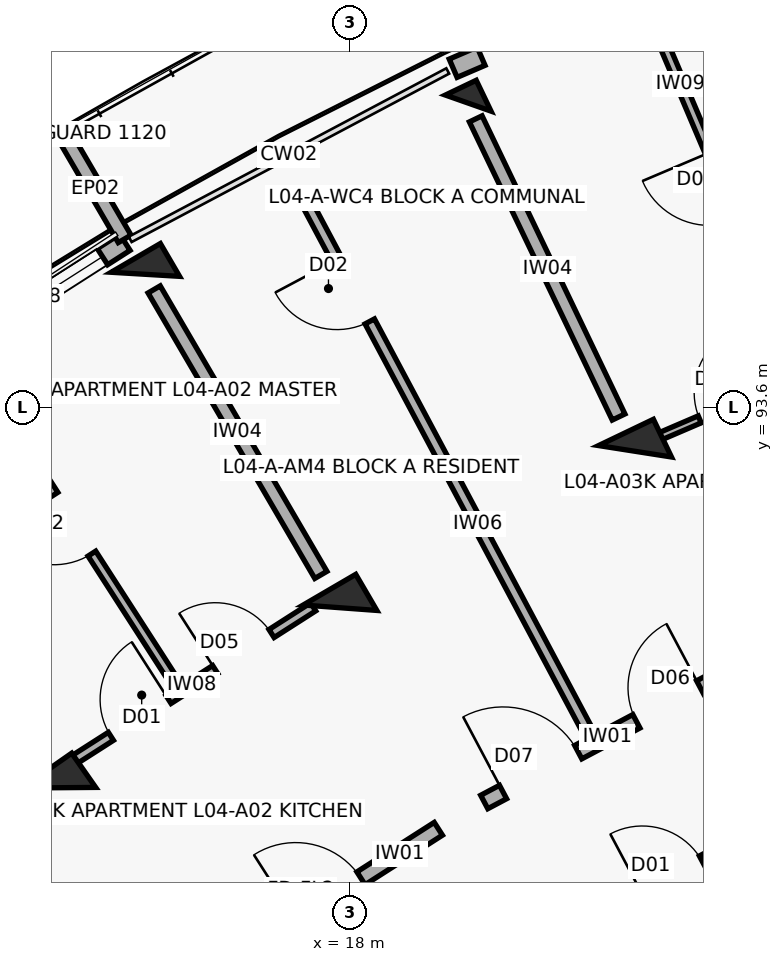
"""IFC4 building model, lengths in metres.
Left out: names, types, materials, properties, quantities, classifications, styles, units other than length and angle.
Written with IfcOpenShell. Run it as: python <this file> out.ifc"""

import sys

from ifc_helpers import new_model, si_unit, direction, frame, frame_2d, origin, origin_2d, place, context, subcontext, project, spatial, rectangle, extrude, element, fill, save


model = new_model("IFC4")
c1 = context("Model", 3, precision=1e-05, world=origin(), true_north=direction((0.0, 1.0)))
c2 = subcontext(c1, "Body", "Model", "MODEL_VIEW")
j1 = project(units=[si_unit("LENGTHUNIT", "METRE"), si_unit("PLANEANGLEUNIT", "RADIAN")], contexts=[c1])
p1 = place(None, origin())
s1 = spatial("IfcSite", under=j1, at=p1, CompositionType="ELEMENT")
p2 = place(p1, origin())
s2 = spatial("IfcBuilding", under=s1, at=p2, CompositionType="ELEMENT")
p3 = place(p2, frame((0.0, 0.0, 14.3)))
s3 = spatial("IfcBuildingStorey", under=s2, at=p3, CompositionType="ELEMENT", Elevation=14.3)
for number, where, z_axis, x_axis in (
    (1, (14.172, 88.592, 0.0), (0.0, 0.0, 1.0), (-0.573, 0.82, 0.0)),
    (2, (17.873, 90.96, 0.0), (0.0, 0.0, 1.0), (-0.504, 0.864, 0.0)),
):
    element("IfcColumn", number, at=place(p3, frame(where, z_axis=z_axis, x_axis=x_axis)), inside=s3, PredefinedType="COLUMN", context=c2, shape_type="SweptSolid", body=[
        extrude(rectangle(XDim=0.55, YDim=0.8, at=origin_2d()), origin(), (0.0, 0.0, 1.0), 3.1),
    ])
p4 = place(p3, frame((15.311, 95.347, 0.0), z_axis=(0.0, 0.0, 1.0), x_axis=(-0.504226211181, 0.863571611366, 0.0)))
e3 = element("IfcColumn", 3, at=p4, inside=s3, PredefinedType="COLUMN", context=c2, shape_type="SweptSolid", body=[
    extrude(rectangle(XDim=0.5, YDim=0.75, at=origin_2d()), origin(), (0.0, 0.0, 1.0), 3.1),
])
p5 = place(p3, frame((21.754, 93.019, 0.0), z_axis=(0.0, 0.0, 1.0), x_axis=(-0.432085748802, 0.901832526405, 0.0)))
e4 = element("IfcColumn", 4, at=p5, inside=s3, PredefinedType="COLUMN", context=c2, shape_type="SweptSolid", body=[
    extrude(rectangle(XDim=0.55, YDim=0.8, at=origin_2d()), origin(), (0.0, 0.0, 1.0), 3.1),
])
p6 = place(p3, frame((19.559, 97.6, 0.0), z_axis=(0.0, 0.0, 1.0), x_axis=(-0.432085748802, 0.901832526405, 0.0)))
e5 = element("IfcColumn", 5, at=p6, inside=s3, PredefinedType="COLUMN", context=c2, shape_type="SweptSolid", body=[
    extrude(rectangle(XDim=0.45, YDim=0.45, at=origin_2d()), origin(), (0.0, 0.0, 1.0), 3.1),
])
p7 = place(p3, frame((10.992, 93.176, 0.0), z_axis=(0.0, 0.0, 1.0), x_axis=(0.84226218024, 0.539068103061, 0.0)))
e6 = element("IfcWall", 6, at=p7, inside=s3, PredefinedType="SOLIDWALL", context=c2, shape_type="SweptSolid", body=[
    extrude(rectangle(XDim=4.809, YDim=0.252, at=frame_2d((2.404, 0.0))), origin(), (0.0, 0.0, 1.0), 2.25),
])
p8 = place(p7, frame((0.4, 0.0, 0.0)))
e7 = element("IfcOpeningElement", 7, at=p8, cuts=e6, PredefinedType="OPENING", context=c2, shape_type="SweptSolid", body=[
    extrude(rectangle(XDim=1.1, YDim=2.15, at=frame_2d((0.55, 1.075))), frame((0.0, 0.136, 0.0), z_axis=(0.0, -1.0, 0.0), x_axis=(1.0, 0.0, 0.0)), (0.0, 0.0, 1.0), 0.272),
])
p9 = place(p7, frame((2.659, 0.0, 0.35)))
e8 = element("IfcOpeningElement", 8, at=p9, cuts=e6, PredefinedType="OPENING", context=c2, shape_type="SweptSolid", body=[
    extrude(rectangle(XDim=1.8, YDim=1.65, at=frame_2d((0.9, 0.825))), frame((0.0, 0.136, 0.0), z_axis=(0.0, -1.0, 0.0), x_axis=(1.0, 0.0, 0.0)), (0.0, 0.0, 1.0), 0.272),
])
p10 = place(p3, frame((15.039, 95.813, 0.0), z_axis=(0.0, 0.0, 1.0), x_axis=(-0.504228145431, 0.863570481985, 0.0)))
e9 = element("IfcWall", 9, at=p10, inside=s3, PredefinedType="PARAPET", context=c2, shape_type="SweptSolid", body=[
    extrude(rectangle(XDim=1.53, YDim=0.195, at=frame_2d((0.765, 0.0))), origin(), (0.0, 0.0, 1.0), 2.25),
])
p11 = place(p3, frame((19.361, 98.059, 0.0), z_axis=(0.0, 0.0, 1.0), x_axis=(0.918711189033, 0.394930058548, 0.0)))
e10 = element("IfcWall", 10, at=p11, inside=s3, PredefinedType="SOLIDWALL", context=c2, shape_type="SweptSolid", body=[
    extrude(rectangle(XDim=4.809, YDim=0.262, at=frame_2d((2.404, 0.0))), origin(), (0.0, 0.0, 1.0), 2.25),
])
p12 = place(p11, frame((0.4, 0.0, 0.0)))
e11 = element("IfcOpeningElement", 11, at=p12, cuts=e10, PredefinedType="OPENING", context=c2, shape_type="SweptSolid", body=[
    extrude(rectangle(XDim=1.1, YDim=2.15, at=frame_2d((0.55, 1.075))), frame((0.0, 0.141, 0.0), z_axis=(0.0, -1.0, 0.0), x_axis=(1.0, 0.0, 0.0)), (0.0, 0.0, 1.0), 0.282),
])
p13 = place(p11, frame((2.659, 0.0, 0.35)))
e12 = element("IfcOpeningElement", 12, at=p13, cuts=e10, PredefinedType="OPENING", context=c2, shape_type="SweptSolid", body=[
    extrude(rectangle(XDim=1.8, YDim=1.65, at=frame_2d((0.9, 0.825))), frame((0.0, 0.141, 0.0), z_axis=(0.0, -1.0, 0.0), x_axis=(1.0, 0.0, 0.0)), (0.0, 0.0, 1.0), 0.282),
])
p14 = place(p3, frame((16.272, 86.199, 0.0), z_axis=(0.0, 0.0, 1.0), x_axis=(0.842257205985, 0.539075874963, 0.0)))
e13 = element("IfcWall", 13, at=p14, inside=s3, PredefinedType="SOLIDWALL", context=c2, shape_type="SweptSolid", body=[
    extrude(rectangle(XDim=3.436, YDim=0.2, at=frame_2d((1.718, 0.0))), origin(), (0.0, 0.0, 1.0), 2.08),
])
p15 = place(p14, frame((1.208, 0.0, 0.0)))
e14 = element("IfcOpeningElement", 14, at=p15, cuts=e13, PredefinedType="OPENING", context=c2, shape_type="SweptSolid", body=[
    extrude(rectangle(XDim=1.02, YDim=2.15, at=frame_2d((0.51, 1.075))), frame((0.0, 0.11, 0.0), z_axis=(0.0, -1.0, 0.0), x_axis=(1.0, 0.0, 0.0)), (0.0, 0.0, 1.0), 0.22),
])
p16 = place(p3, frame((14.311, 88.917, 0.0), z_axis=(0.0, 0.0, 1.0), x_axis=(0.842238809758, 0.53910461632, 0.0)))
e15 = element("IfcWall", 15, at=p16, inside=s3, PredefinedType="PARTITIONING", context=c2, shape_type="SweptSolid", body=[
    extrude(rectangle(XDim=3.81, YDim=0.125, at=frame_2d((1.905, 0.0))), origin(), (0.0, 0.0, 1.0), 2.08),
])
p17 = place(p16, frame((0.65, 0.0, 0.0)))
e16 = element("IfcOpeningElement", 16, at=p17, cuts=e15, PredefinedType="OPENING", context=c2, shape_type="SweptSolid", body=[
    extrude(rectangle(XDim=0.9, YDim=2.1, at=frame_2d((0.45, 1.05))), frame((0.0, 0.073, 0.0), z_axis=(0.0, -1.0, 0.0), x_axis=(1.0, 0.0, 0.0)), (0.0, 0.0, 1.0), 0.145),
])
p18 = place(p16, frame((2.28, 0.0, 0.0)))
e17 = element("IfcOpeningElement", 17, at=p18, cuts=e15, PredefinedType="OPENING", context=c2, shape_type="SweptSolid", body=[
    extrude(rectangle(XDim=0.88, YDim=2.1, at=frame_2d((0.44, 1.05))), frame((0.0, 0.073, 0.0), z_axis=(0.0, -1.0, 0.0), x_axis=(1.0, 0.0, 0.0)), (0.0, 0.0, 1.0), 0.145),
])
p19 = place(p3, frame((15.645, 90.062, 0.0), z_axis=(0.0, 0.0, 1.0), x_axis=(-0.541596414291, 0.840638640574, 0.0)))
e18 = element("IfcWall", 18, at=p19, inside=s3, PredefinedType="PARTITIONING", context=c2, shape_type="SweptSolid", body=[
    extrude(rectangle(XDim=4.75, YDim=0.12, at=frame_2d((2.375, 0.0))), origin(), (0.0, 0.0, 1.0), 2.08),
])
p20 = place(p19, frame((1.915, 0.0, 0.0)))
e19 = element("IfcOpeningElement", 19, at=p20, cuts=e18, PredefinedType="OPENING", context=c2, shape_type="SweptSolid", body=[
    extrude(rectangle(XDim=0.92, YDim=2.1, at=frame_2d((0.46, 1.05))), frame((0.0, 0.07, 0.0), z_axis=(0.0, -1.0, 0.0), x_axis=(1.0, 0.0, 0.0)), (0.0, 0.0, 1.0), 0.14),
])
p21 = place(p3, frame((19.77, 88.404, 0.0), z_axis=(0.0, 0.0, 1.0), x_axis=(0.883410853063, 0.468599258099, 0.0)))
e20 = element("IfcWall", 20, at=p21, inside=s3, PredefinedType="SOLIDWALL", context=c2, shape_type="SweptSolid", body=[
    extrude(rectangle(XDim=3.436, YDim=0.2, at=frame_2d((1.718, 0.0))), origin(), (0.0, 0.0, 1.0), 2.08),
])
p22 = place(p21, frame((0.28, 0.0, 0.0)))
e21 = element("IfcOpeningElement", 21, at=p22, cuts=e20, PredefinedType="OPENING", context=c2, shape_type="SweptSolid", body=[
    extrude(rectangle(XDim=1.12, YDim=2.15, at=frame_2d((0.56, 1.075))), frame((0.0, 0.11, 0.0), z_axis=(0.0, -1.0, 0.0), x_axis=(1.0, 0.0, 0.0)), (0.0, 0.0, 1.0), 0.22),
])
p23 = place(p21, frame((2.266, 0.0, 0.0)))
e22 = element("IfcOpeningElement", 22, at=p23, cuts=e20, PredefinedType="OPENING", context=c2, shape_type="SweptSolid", body=[
    extrude(rectangle(XDim=0.95, YDim=2.1, at=frame_2d((0.475, 1.05))), frame((0.0, 0.11, 0.0), z_axis=(0.0, -1.0, 0.0), x_axis=(1.0, 0.0, 0.0)), (0.0, 0.0, 1.0), 0.22),
])
p24 = place(p3, frame((20.804, 86.634, 0.0), z_axis=(0.0, 0.0, 1.0), x_axis=(0.883444301944, 0.468536194293, 0.0)))
e23 = element("IfcWall", 23, at=p24, inside=s3, PredefinedType="SOLIDWALL", context=c2, shape_type="SweptSolid", body=[
    extrude(rectangle(XDim=3.269, YDim=0.19, at=frame_2d((1.634, 0.0))), origin(), (0.0, 0.0, 1.0), 2.08),
])
p25 = place(p24, frame((1.184, 0.0, 0.0)))
e24 = element("IfcOpeningElement", 24, at=p25, cuts=e23, PredefinedType="OPENING", context=c2, shape_type="SweptSolid", body=[
    extrude(rectangle(XDim=0.9, YDim=2.1, at=frame_2d((0.45, 1.05))), frame((0.0, 0.105, 0.0), z_axis=(0.0, -1.0, 0.0), x_axis=(1.0, 0.0, 0.0)), (0.0, 0.0, 1.0), 0.21),
])
p26 = place(p3, frame((21.107, 89.387, 0.0), z_axis=(0.0, 0.0, 1.0), x_axis=(-0.469891538074, 0.882724159886, 0.0)))
e25 = element("IfcWall", 25, at=p26, inside=s3, PredefinedType="PARTITIONING", context=c2, shape_type="SweptSolid", body=[
    extrude(rectangle(XDim=7.95, YDim=0.14, at=frame_2d((3.975, 0.0))), origin(), (0.0, 0.0, 1.0), 2.08),
])
p27 = place(p26, frame((6.05, 0.0, 0.0)))
e26 = element("IfcOpeningElement", 26, at=p27, cuts=e25, PredefinedType="OPENING", context=c2, shape_type="SweptSolid", body=[
    extrude(rectangle(XDim=0.92, YDim=2.1, at=frame_2d((0.46, 1.05))), frame((0.0, 0.08, 0.0), z_axis=(0.0, -1.0, 0.0), x_axis=(1.0, 0.0, 0.0)), (0.0, 0.0, 1.0), 0.16),
])
p28 = place(p3, frame((17.621, 91.392, 0.0), z_axis=(0.0, 0.0, 1.0), x_axis=(-0.504216452091, 0.863577309475, 0.0)))
e27 = element("IfcWall", 27, at=p28, inside=s3, PredefinedType="SOLIDWALL", context=c2, shape_type="SweptSolid", body=[
    extrude(rectangle(XDim=4.35, YDim=0.185, at=frame_2d((2.175, 0.0))), origin(), (0.0, 0.0, 1.0), 2.08),
])
p29 = place(p3, frame((22.008, 93.182, 0.0), z_axis=(0.0, 0.0, 1.0), x_axis=(0.918732171064, 0.394881245253, 0.0)))
e28 = element("IfcWall", 28, at=p29, inside=s3, PredefinedType="PARTITIONING", context=c2, shape_type="SweptSolid", body=[
    extrude(rectangle(XDim=3.797, YDim=0.1, at=frame_2d((1.899, 0.0))), origin(), (0.0, 0.0, 1.0), 2.08),
])
p30 = place(p29, frame((0.65, 0.0, 0.0)))
e29 = element("IfcOpeningElement", 29, at=p30, cuts=e28, PredefinedType="OPENING", context=c2, shape_type="SweptSolid", body=[
    extrude(rectangle(XDim=0.9, YDim=2.1, at=frame_2d((0.45, 1.05))), frame((0.0, 0.06, 0.0), z_axis=(0.0, -1.0, 0.0), x_axis=(1.0, 0.0, 0.0)), (0.0, 0.0, 1.0), 0.12),
])
p31 = place(p29, frame((2.267, 0.0, 0.0)))
e30 = element("IfcOpeningElement", 30, at=p31, cuts=e28, PredefinedType="OPENING", context=c2, shape_type="SweptSolid", body=[
    extrude(rectangle(XDim=0.88, YDim=2.1, at=frame_2d((0.44, 1.05))), frame((0.0, 0.06, 0.0), z_axis=(0.0, -1.0, 0.0), x_axis=(1.0, 0.0, 0.0)), (0.0, 0.0, 1.0), 0.12),
])
p32 = place(p3, frame((23.88, 94.253, 0.0), z_axis=(0.0, 0.0, 1.0), x_axis=(-0.39076607415, 0.920490019116, 0.0)))
e31 = element("IfcWall", 31, at=p32, inside=s3, PredefinedType="PARTITIONING", context=c2, shape_type="SweptSolid", body=[
    extrude(rectangle(XDim=4.9, YDim=0.12, at=frame_2d((2.45, 0.0))), origin(), (0.0, 0.0, 1.0), 2.08),
])
p33 = place(p32, frame((1.97, 0.0, 0.0)))
e32 = element("IfcOpeningElement", 32, at=p33, cuts=e31, PredefinedType="OPENING", context=c2, shape_type="SweptSolid", body=[
    extrude(rectangle(XDim=0.96, YDim=2.1, at=frame_2d((0.48, 1.05))), frame((0.0, 0.07, 0.0), z_axis=(0.0, -1.0, 0.0), x_axis=(1.0, 0.0, 0.0)), (0.0, 0.0, 1.0), 0.14),
])
p34 = place(p3, frame((21.538, 93.469, 0.0), z_axis=(0.0, 0.0, 1.0), x_axis=(-0.432086898897, 0.901831975371, 0.0)))
e33 = element("IfcWall", 33, at=p34, inside=s3, PredefinedType="SOLIDWALL", context=c2, shape_type="SweptSolid", body=[
    extrude(rectangle(XDim=4.35, YDim=0.185, at=frame_2d((2.175, 0.0))), origin(), (0.0, 0.0, 1.0), 2.08),
])
p35 = place(p9, origin())
e34 = element("IfcWindow", 34, at=p35, inside=s3, PartitioningType="TRIPLE_PANEL_VERTICAL", PredefinedType="WINDOW", context=c2, shape_type="SweptSolid", body=[
    extrude(rectangle(XDim=1.8, YDim=1.65, at=frame_2d((0.9, 0.825))), frame((0.0, 0.03, 0.0), z_axis=(0.0, -1.0, 0.0), x_axis=(1.0, 0.0, 0.0)), (0.0, 0.0, 1.0), 0.06),
])
fill(e8, e34)
p36 = place(p12, origin())
e35 = element("IfcDoor", 35, at=p36, inside=s3, OperationType="SINGLE_SWING_LEFT", PredefinedType="DOOR", context=c2, shape_type="SweptSolid", body=[
    extrude(rectangle(XDim=1.1, YDim=2.15, at=frame_2d((0.55, 1.075))), frame((0.0, 0.025, 0.0), z_axis=(0.0, -1.0, 0.0), x_axis=(1.0, 0.0, 0.0)), (0.0, 0.0, 1.0), 0.05),
])
fill(e11, e35)
p37 = place(p15, origin())
e36 = element("IfcDoor", 36, at=p37, inside=s3, OperationType="SINGLE_SWING_LEFT", PredefinedType="DOOR", context=c2, shape_type="SweptSolid", body=[
    extrude(rectangle(XDim=1.02, YDim=2.15, at=frame_2d((0.51, 1.075))), frame((0.0, 0.025, 0.0), z_axis=(0.0, -1.0, 0.0), x_axis=(1.0, 0.0, 0.0)), (0.0, 0.0, 1.0), 0.05),
])
fill(e14, e36)
p38 = place(p17, origin())
e37 = element("IfcDoor", 37, at=p38, inside=s3, OperationType="SINGLE_SWING_RIGHT", PredefinedType="DOOR", context=c2, shape_type="SweptSolid", body=[
    extrude(rectangle(XDim=0.9, YDim=2.1, at=frame_2d((0.45, 1.05))), frame((0.0, 0.025, 0.0), z_axis=(0.0, -1.0, 0.0), x_axis=(1.0, 0.0, 0.0)), (0.0, 0.0, 1.0), 0.05),
])
fill(e16, e37)
p39 = place(p18, origin())
e38 = element("IfcDoor", 38, at=p39, inside=s3, OperationType="SINGLE_SWING_LEFT", PredefinedType="DOOR", context=c2, shape_type="SweptSolid", body=[
    extrude(rectangle(XDim=0.88, YDim=2.1, at=frame_2d((0.44, 1.05))), frame((0.0, 0.025, 0.0), z_axis=(0.0, -1.0, 0.0), x_axis=(1.0, 0.0, 0.0)), (0.0, 0.0, 1.0), 0.05),
])
fill(e17, e38)
p40 = place(p20, origin())
e39 = element("IfcDoor", 39, at=p40, inside=s3, OperationType="SINGLE_SWING_RIGHT", PredefinedType="DOOR", context=c2, shape_type="SweptSolid", body=[
    extrude(rectangle(XDim=0.92, YDim=2.1, at=frame_2d((0.46, 1.05))), frame((0.0, 0.025, 0.0), z_axis=(0.0, -1.0, 0.0), x_axis=(1.0, 0.0, 0.0)), (0.0, 0.0, 1.0), 0.05),
])
fill(e19, e39)
p41 = place(p22, origin())
e40 = element("IfcDoor", 40, at=p41, inside=s3, OperationType="SINGLE_SWING_LEFT", PredefinedType="DOOR", context=c2, shape_type="SweptSolid", body=[
    extrude(rectangle(XDim=1.12, YDim=2.15, at=frame_2d((0.56, 1.075))), frame((0.0, 0.025, 0.0), z_axis=(0.0, -1.0, 0.0), x_axis=(1.0, 0.0, 0.0)), (0.0, 0.0, 1.0), 0.05),
])
fill(e21, e40)
p42 = place(p23, origin())
e41 = element("IfcDoor", 41, at=p42, inside=s3, OperationType="SINGLE_SWING_RIGHT", PredefinedType="DOOR", context=c2, shape_type="SweptSolid", body=[
    extrude(rectangle(XDim=0.95, YDim=2.1, at=frame_2d((0.475, 1.05))), frame((0.0, 0.025, 0.0), z_axis=(0.0, -1.0, 0.0), x_axis=(1.0, 0.0, 0.0)), (0.0, 0.0, 1.0), 0.05),
])
fill(e22, e41)
p43 = place(p25, origin())
e42 = element("IfcDoor", 42, at=p43, inside=s3, OperationType="SINGLE_SWING_LEFT", PredefinedType="DOOR", context=c2, shape_type="SweptSolid", body=[
    extrude(rectangle(XDim=0.9, YDim=2.1, at=frame_2d((0.45, 1.05))), frame((0.0, 0.025, 0.0), z_axis=(0.0, -1.0, 0.0), x_axis=(1.0, 0.0, 0.0)), (0.0, 0.0, 1.0), 0.05),
])
fill(e24, e42)
p44 = place(p27, origin())
e43 = element("IfcDoor", 43, at=p44, inside=s3, OperationType="SINGLE_SWING_RIGHT", PredefinedType="DOOR", context=c2, shape_type="SweptSolid", body=[
    extrude(rectangle(XDim=0.92, YDim=2.1, at=frame_2d((0.46, 1.05))), frame((0.0, 0.025, 0.0), z_axis=(0.0, -1.0, 0.0), x_axis=(1.0, 0.0, 0.0)), (0.0, 0.0, 1.0), 0.05),
])
fill(e26, e43)
p45 = place(p30, origin())
e44 = element("IfcDoor", 44, at=p45, inside=s3, OperationType="SINGLE_SWING_RIGHT", PredefinedType="DOOR", context=c2, shape_type="SweptSolid", body=[
    extrude(rectangle(XDim=0.9, YDim=2.1, at=frame_2d((0.45, 1.05))), frame((0.0, 0.025, 0.0), z_axis=(0.0, -1.0, 0.0), x_axis=(1.0, 0.0, 0.0)), (0.0, 0.0, 1.0), 0.05),
])
fill(e29, e44)
save(model, sys.argv[1])
